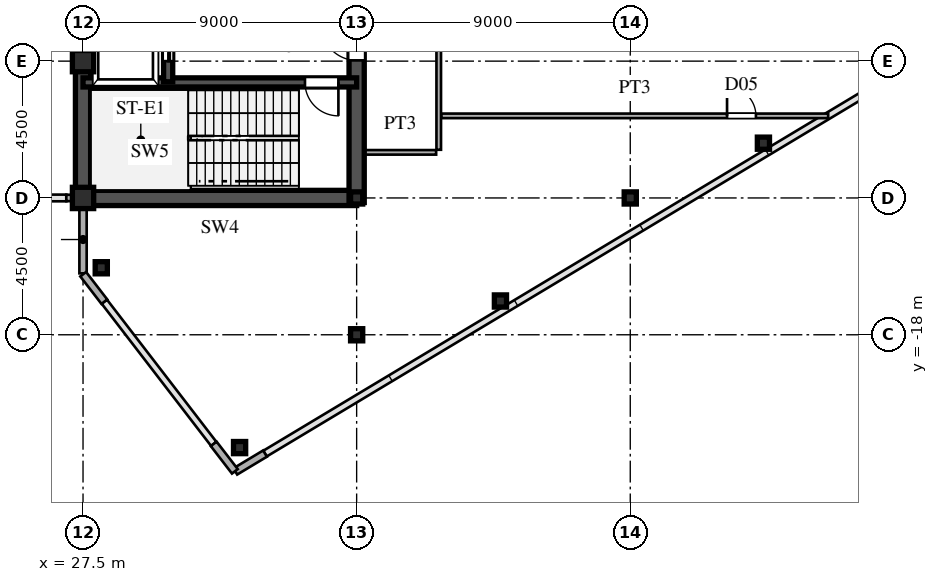
"""IFC4 building model, lengths in metres.
Left out: names, types, materials, properties, quantities, classifications, styles, units other than length and angle.
Written with IfcOpenShell. Run it as: python <this file> out.ifc"""

import sys

from ifc_helpers import new_model, si_unit, direction, frame, frame_2d, origin, origin_2d, place, context, subcontext, project, spatial, rectangle, hollow_rectangle, i_section, extrude, source, transform, mapped, element, fill, save


model = new_model("IFC4")
c1 = context("Model", 3, precision=1e-05, world=origin(), true_north=direction((0.0, 1.0)))
c2 = subcontext(c1, "Body", "Model", "MODEL_VIEW")
j1 = project(units=[si_unit("LENGTHUNIT", "METRE"), si_unit("PLANEANGLEUNIT", "RADIAN")], contexts=[c1])
p1 = place(None, origin())
s1 = spatial("IfcSite", under=j1, at=p1, CompositionType="ELEMENT")
p2 = place(p1, origin())
s2 = spatial("IfcBuilding", under=s1, at=p2, CompositionType="ELEMENT")
p3 = place(p2, frame((0.0, 0.0, 274.2)))
s3 = spatial("IfcBuildingStorey", under=s2, at=p3, CompositionType="ELEMENT", Elevation=274.2)
m1 = source(origin(), c2, "Body", "SweptSolid", [
    extrude(hollow_rectangle(XDim=0.7, YDim=0.7, WallThickness=0.03, at=origin_2d()), origin(), (0.0, 0.0, 1.0), 4.8),
])
for number, where, z_axis, x_axis in (
    (1, (27.5, -13.5, 0.0), (0.0, 0.0, 1.0), (1.0, 0.0, 0.0)),
    (2, (27.5, -9.0, 0.0), (0.0, 0.0, 1.0), (1.0, 0.0, 0.0)),
):
    element("IfcColumn", number, at=place(p3, frame(where, z_axis=z_axis, x_axis=x_axis)), inside=s3, PredefinedType="COLUMN", context=c2, shape_type="MappedRepresentation", body=[
        mapped(m1, transform((0.0, 0.0, 0.0), scale=1.0)),
    ])
m2 = source(origin(), c2, "Body", "SweptSolid", [
    extrude(i_section(OverallWidth=0.4, OverallDepth=0.4, WebThickness=0.013, FlangeThickness=0.021, at=origin_2d()), origin(), (0.0, 0.0, 1.0), 4.8),
])
for number, where, z_axis, x_axis in (
    (3, (36.5, -18.0, 0.0), (0.0, 0.0, 1.0), (1.0, 0.0, 0.0)),
    (4, (36.5, -13.5, 0.0), (0.0, 0.0, 1.0), (1.0, 0.0, 0.0)),
    (5, (45.5, -13.5, 0.0), (0.0, 0.0, 1.0), (1.0, 0.0, 0.0)),
):
    element("IfcColumn", number, at=place(p3, frame(where, z_axis=z_axis, x_axis=x_axis)), inside=s3, PredefinedType="COLUMN", context=c2, shape_type="MappedRepresentation", body=[
        mapped(m2, transform((0.0, 0.0, 0.0), scale=1.0)),
    ])
m3 = source(origin(), c2, "Body", "SweptSolid", [
    extrude(hollow_rectangle(XDim=0.4, YDim=0.4, WallThickness=0.016, at=origin_2d()), origin(), (0.0, 0.0, 1.0), 4.8),
])
for number, where, z_axis, x_axis in (
    (6, (32.65, -21.71, 0.0), (0.0, 0.0, 1.0), (1.0, 0.0, 0.0)),
    (7, (28.1, -15.796, 0.0), (0.0, 0.0, 1.0), (1.0, 0.0, 0.0)),
    (8, (41.23, -16.889, 0.0), (0.0, 0.0, 1.0), (1.0, 0.0, 0.0)),
    (9, (49.88, -11.699, 0.0), (0.0, 0.0, 1.0), (1.0, 0.0, 0.0)),
):
    element("IfcColumn", number, at=place(p3, frame(where, z_axis=z_axis, x_axis=x_axis)), inside=s3, PredefinedType="COLUMN", context=c2, shape_type="MappedRepresentation", body=[
        mapped(m3, transform((0.0, 0.0, 0.0), scale=1.0)),
    ])
p4 = place(p3, frame((32.509, -22.495, 0.0), z_axis=(0.0, 0.0, 1.0), x_axis=(0.85743623509, 0.514590228002, 0.0)))
e10 = element("IfcWall", 10, at=p4, inside=s3, PredefinedType="SOLIDWALL", context=c2, shape_type="SweptSolid", body=[
    extrude(rectangle(XDim=1.14, YDim=0.24, at=frame_2d((0.57, 0.0))), origin(), (0.0, 0.0, 1.0), 4.52),
])
p5 = place(p3, frame((27.5, -15.98, 0.0), z_axis=(0.0, 0.0, 1.0), x_axis=(0.0, 1.0, 0.0)))
e11 = element("IfcWall", 11, at=p5, inside=s3, PredefinedType="SOLIDWALL", context=c2, shape_type="SweptSolid", body=[
    extrude(rectangle(XDim=1.605, YDim=0.24, at=frame_2d((0.803, 0.0))), origin(), (0.0, 0.0, 1.0), 4.52),
])
p6 = place(p3, frame((27.5, -14.375, 0.0), z_axis=(0.0, 0.0, 1.0), x_axis=(0.0, 1.0, 0.0)))
e12 = element("IfcWall", 12, at=p6, inside=s3, PredefinedType="SOLIDWALL", context=c2, shape_type="SweptSolid", body=[
    extrude(rectangle(XDim=0.62, YDim=0.24, at=frame_2d((0.31, 0.0))), origin(), (0.0, 0.0, 1.0), 4.02),
])
for number, where, z_axis, x_axis in (
    (13, (27.506, -16.008, 0.0), (0.0, 0.0, 1.0), (0.61, -0.793, 0.0)),
    (14, (31.799, -21.588, 0.0), (0.0, 0.0, 1.0), (0.61, -0.793, 0.0)),
):
    element("IfcWall", number, at=place(p3, frame(where, z_axis=z_axis, x_axis=x_axis)), inside=s3, PredefinedType="SOLIDWALL", context=c2, shape_type="SweptSolid", body=[
        extrude(rectangle(XDim=1.14, YDim=0.24, at=frame_2d((0.57, 0.0))), origin(), (0.0, 0.0, 1.0), 4.52),
    ])
p7 = place(p3, frame((26.95, -13.5, 0.0), z_axis=(0.0, 0.0, 1.0), x_axis=(1.0, 0.0, 0.0)))
e15 = element("IfcWall", 15, at=p7, inside=s3, PredefinedType="SOLIDWALL", context=c2, shape_type="SweptSolid", body=[
    extrude(rectangle(XDim=0.54, YDim=0.21, at=frame_2d((0.27, 0.0))), origin(), (0.0, 0.0, 1.0), 4.02),
])
p8 = place(p3, frame((27.5, -13.5, 0.0), z_axis=(0.0, 0.0, 1.0), x_axis=(0.0, 1.0, 0.0)))
e16 = element("IfcWall", 16, at=p8, inside=s3, PredefinedType="SHEAR", context=c2, shape_type="SweptSolid", body=[
    extrude(rectangle(XDim=12.2, YDim=0.5, at=frame_2d((6.1, 0.0))), origin(), (0.0, 0.0, 1.0), 4.52),
])
p9 = place(p3, frame((27.5, -13.5, 0.0), z_axis=(0.0, 0.0, 1.0), x_axis=(1.0, 0.0, 0.0)))
e17 = element("IfcWall", 17, at=p9, inside=s3, PredefinedType="SHEAR", context=c2, shape_type="SweptSolid", body=[
    extrude(rectangle(XDim=9.0, YDim=0.5, at=frame_2d((4.5, 0.0))), origin(), (0.0, 0.0, 1.0), 4.52),
])
p10 = place(p3, frame((36.5, -13.65, 0.0), z_axis=(0.0, 0.0, 1.0), x_axis=(0.0, 1.0, 0.0)))
e18 = element("IfcWall", 18, at=p10, inside=s3, PredefinedType="SHEAR", context=c2, shape_type="SweptSolid", body=[
    extrude(rectangle(XDim=7.15, YDim=0.5, at=frame_2d((3.575, 0.0))), origin(), (0.0, 0.0, 1.0), 4.52),
])
p11 = place(p10, frame((4.675, 0.0, 0.0)))
e19 = element("IfcOpeningElement", 19, at=p11, cuts=e18, PredefinedType="OPENING", context=c2, shape_type="SweptSolid", body=[
    extrude(rectangle(XDim=1.15, YDim=2.2, at=frame_2d((0.575, 1.1))), frame((0.0, 0.26, 0.0), z_axis=(0.0, -1.0, 0.0), x_axis=(1.0, 0.0, 0.0)), (0.0, 0.0, 1.0), 0.52),
])
p12 = place(p3, frame((27.5, -9.7, 0.0), z_axis=(0.0, 0.0, 1.0), x_axis=(1.0, 0.0, 0.0)))
e20 = element("IfcWall", 20, at=p12, inside=s3, PredefinedType="SHEAR", context=c2, shape_type="SweptSolid", body=[
    extrude(rectangle(XDim=9.0, YDim=0.3, at=frame_2d((4.5, 0.0))), origin(), (0.0, 0.0, 1.0), 4.52),
])
p13 = place(p12, frame((7.3, 0.0, 0.0)))
e21 = element("IfcOpeningElement", 21, at=p13, cuts=e20, PredefinedType="OPENING", context=c2, shape_type="SweptSolid", body=[
    extrude(rectangle(XDim=1.1, YDim=2.2, at=frame_2d((0.55, 1.1))), frame((0.0, 0.16, 0.0), z_axis=(0.0, -1.0, 0.0), x_axis=(1.0, 0.0, 0.0)), (0.0, 0.0, 1.0), 0.32),
])
p14 = place(p3, frame((30.3, -9.68, 0.0), z_axis=(0.0, 0.0, 1.0), x_axis=(0.0, 1.0, 0.0)))
e22 = element("IfcWall", 22, at=p14, inside=s3, PredefinedType="SHEAR", context=c2, shape_type="SweptSolid", body=[
    extrude(rectangle(XDim=2.56, YDim=0.3, at=frame_2d((1.28, 0.0))), origin(), (0.0, 0.0, 1.0), 4.52),
])
p15 = place(p14, frame((0.68, 0.0, 0.0)))
e23 = element("IfcOpeningElement", 23, at=p15, cuts=e22, PredefinedType="OPENING", context=c2, shape_type="SweptSolid", body=[
    extrude(rectangle(XDim=1.2, YDim=2.25, at=frame_2d((0.6, 1.125))), frame((0.0, 0.16, 0.0), z_axis=(0.0, -1.0, 0.0), x_axis=(1.0, 0.0, 0.0)), (0.0, 0.0, 1.0), 0.32),
])
p16 = place(p3, frame((36.755, -12.0, 0.0), z_axis=(0.0, 0.0, 1.0), x_axis=(1.0, 0.0, 0.0)))
e24 = element("IfcWall", 24, at=p16, inside=s3, PredefinedType="PARTITIONING", context=c2, shape_type="SweptSolid", body=[
    extrude(rectangle(XDim=2.36, YDim=0.15, at=frame_2d((1.18, 0.0))), origin(), (0.0, 0.0, 1.0), 4.52),
])
p17 = place(p3, frame((39.285, -10.8, 0.0), z_axis=(0.0, 0.0, 1.0), x_axis=(1.0, 0.0, 0.0)))
e25 = element("IfcWall", 25, at=p17, inside=s3, PredefinedType="PARTITIONING", context=c2, shape_type="SweptSolid", body=[
    extrude(rectangle(XDim=12.725, YDim=0.15, at=frame_2d((6.363, 0.0))), origin(), (0.0, 0.0, 1.0), 4.52),
])
p18 = place(p17, frame((9.399, 0.0, 0.0)))
e26 = element("IfcOpeningElement", 26, at=p18, cuts=e25, PredefinedType="OPENING", context=c2, shape_type="SweptSolid", body=[
    extrude(rectangle(XDim=0.95, YDim=2.15, at=frame_2d((0.475, 1.075))), frame((0.0, 0.085, 0.0), z_axis=(0.0, -1.0, 0.0), x_axis=(1.0, 0.0, 0.0)), (0.0, 0.0, 1.0), 0.17),
])
p19 = place(p3, frame((39.2, -11.915, 0.0), z_axis=(0.0, 0.0, 1.0), x_axis=(0.0, 1.0, 0.0)))
e27 = element("IfcWall", 27, at=p19, inside=s3, PredefinedType="PARTITIONING", context=c2, shape_type="SweptSolid", body=[
    extrude(rectangle(XDim=23.83, YDim=0.15, at=frame_2d((11.915, 0.0))), origin(), (0.0, 0.0, 1.0), 4.52),
])
p20 = place(p19, frame((11.44, 0.0, 0.0)))
e28 = element("IfcOpeningElement", 28, at=p20, cuts=e27, PredefinedType="OPENING", context=c2, shape_type="SweptSolid", body=[
    extrude(rectangle(XDim=0.95, YDim=2.15, at=frame_2d((0.475, 1.075))), frame((0.0, 0.085, 0.0), z_axis=(0.0, -1.0, 0.0), x_axis=(1.0, 0.0, 0.0)), (0.0, 0.0, 1.0), 0.17),
])
m4 = source(origin(), c2, "Body", "SweptSolid", [
    extrude(rectangle(XDim=1.15, YDim=2.2, at=frame_2d((0.575, 1.1))), frame((0.0, 0.025, 0.0), z_axis=(0.0, -1.0, 0.0), x_axis=(1.0, 0.0, 0.0)), (0.0, 0.0, 1.0), 0.05),
])
p21 = place(p11, origin())
e29 = element("IfcDoor", 29, at=p21, inside=s3, OperationType="SINGLE_SWING_RIGHT", PredefinedType="DOOR", context=c2, shape_type="MappedRepresentation", body=[
    mapped(m4, transform((0.0, 0.0, 0.0), scale=1.0)),
])
fill(e19, e29)
m5 = source(origin(), c2, "Body", "SweptSolid", [
    extrude(rectangle(XDim=1.1, YDim=2.2, at=frame_2d((0.55, 1.1))), frame((0.0, 0.025, 0.0), z_axis=(0.0, -1.0, 0.0), x_axis=(1.0, 0.0, 0.0)), (0.0, 0.0, 1.0), 0.05),
])
p22 = place(p13, frame((1.1, 0.0, 0.0), z_axis=(0.0, 0.0, 1.0), x_axis=(-1.0, 0.0, 0.0)))
e30 = element("IfcDoor", 30, at=p22, inside=s3, OperationType="SINGLE_SWING_RIGHT", PredefinedType="DOOR", context=c2, shape_type="MappedRepresentation", body=[
    mapped(m5, transform((0.0, 0.0, 0.0), scale=1.0)),
])
fill(e21, e30)
m6 = source(origin(), c2, "Body", "SweptSolid", [
    extrude(rectangle(XDim=1.2, YDim=2.25, at=frame_2d((0.6, 1.125))), frame((0.0, 0.025, 0.0), z_axis=(0.0, -1.0, 0.0), x_axis=(1.0, 0.0, 0.0)), (0.0, 0.0, 1.0), 0.05),
])
p23 = place(p15, origin())
e31 = element("IfcDoor", 31, at=p23, inside=s3, OperationType="DOUBLE_DOOR_SLIDING", PredefinedType="DOOR", context=c2, shape_type="MappedRepresentation", body=[
    mapped(m6, transform((0.0, 0.0, 0.0), scale=1.0)),
])
fill(e23, e31)
m7 = source(origin(), c2, "Body", "SweptSolid", [
    extrude(rectangle(XDim=0.95, YDim=2.15, at=frame_2d((0.475, 1.075))), frame((0.0, 0.025, 0.0), z_axis=(0.0, -1.0, 0.0), x_axis=(1.0, 0.0, 0.0)), (0.0, 0.0, 1.0), 0.05),
])
p24 = place(p18, origin())
e32 = element("IfcDoor", 32, at=p24, inside=s3, OperationType="SINGLE_SWING_LEFT", PredefinedType="DOOR", context=c2, shape_type="MappedRepresentation", body=[
    mapped(m7, transform((0.0, 0.0, 0.0), scale=1.0)),
])
fill(e26, e32)
save(model, sys.argv[1])
